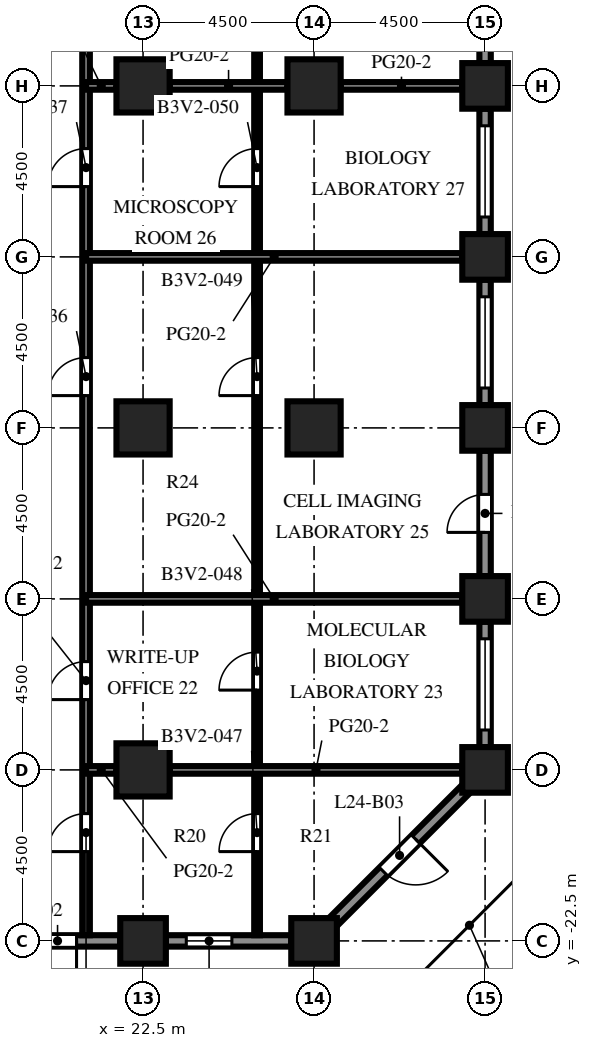
"""IFC4 building model, lengths in metres.
Left out: names, types, materials, properties, quantities, classifications, styles, units other than length and angle.
Written with IfcOpenShell. Run it as: python <this file> out.ifc"""

import sys

from ifc_helpers import new_model, si_unit, direction, frame, frame_2d, origin, origin_2d, place, context, subcontext, project, spatial, rectangle, extrude, element, fill, save


model = new_model("IFC4")
c1 = context("Model", 3, precision=1e-05, world=origin(), true_north=direction((0.0, 1.0)))
c2 = subcontext(c1, "Body", "Model", "MODEL_VIEW")
j1 = project(units=[si_unit("LENGTHUNIT", "METRE"), si_unit("PLANEANGLEUNIT", "RADIAN")], contexts=[c1])
p1 = place(None, origin())
s1 = spatial("IfcSite", under=j1, at=p1, CompositionType="ELEMENT")
p2 = place(p1, origin())
s2 = spatial("IfcBuilding", under=s1, at=p2, CompositionType="ELEMENT")
p3 = place(p2, frame((0.0, 0.0, 106.6)))
s3 = spatial("IfcBuildingStorey", under=s2, at=p3, CompositionType="ELEMENT", Elevation=106.6)
for number, where, z_axis, x_axis in (
    (1, (22.5, -22.5, 0.0), (0.0, 0.0, 1.0), (1.0, 0.0, 0.0)),
    (2, (27.0, -22.5, 0.0), (0.0, 0.0, 1.0), (1.0, 0.0, 0.0)),
    (3, (31.5, -18.0, 0.0), (0.0, 0.0, 1.0), (1.0, 0.0, 0.0)),
    (4, (31.5, -13.5, 0.0), (0.0, 0.0, 1.0), (1.0, 0.0, 0.0)),
    (5, (31.5, -9.0, 0.0), (0.0, 0.0, 1.0), (1.0, 0.0, 0.0)),
    (6, (31.5, -4.5, 0.0), (0.0, 0.0, 1.0), (1.0, 0.0, 0.0)),
    (7, (31.5, 0.0, 0.0), (0.0, 0.0, 1.0), (1.0, 0.0, 0.0)),
):
    element("IfcColumn", number, at=place(p3, frame(where, z_axis=z_axis, x_axis=x_axis)), inside=s3, PredefinedType="COLUMN", context=c2, shape_type="SweptSolid", body=[
        extrude(rectangle(XDim=1.2, YDim=1.2, at=origin_2d()), origin(), (0.0, 0.0, 1.0), 4.1),
    ])
for number, where, z_axis, x_axis in (
    (8, (22.5, -18.0, 0.0), (0.0, 0.0, 1.0), (1.0, 0.0, 0.0)),
    (9, (22.5, -9.0, 0.0), (0.0, 0.0, 1.0), (1.0, 0.0, 0.0)),
    (10, (22.5, 0.0, 0.0), (0.0, 0.0, 1.0), (1.0, 0.0, 0.0)),
    (11, (27.0, -9.0, 0.0), (0.0, 0.0, 1.0), (1.0, 0.0, 0.0)),
    (12, (27.0, 0.0, 0.0), (0.0, 0.0, 1.0), (1.0, 0.0, 0.0)),
):
    element("IfcColumn", number, at=place(p3, frame(where, z_axis=z_axis, x_axis=x_axis)), inside=s3, PredefinedType="COLUMN", context=c2, shape_type="SweptSolid", body=[
        extrude(rectangle(XDim=1.4, YDim=1.4, at=origin_2d()), origin(), (0.0, 0.0, 1.0), 4.1),
    ])
p4 = place(p3, frame((21.9, -22.5, 0.0), z_axis=(0.0, 0.0, 1.0), x_axis=(-1.0, 0.0, 0.0)))
e13 = element("IfcWall", 13, at=p4, inside=s3, PredefinedType="SOLIDWALL", context=c2, shape_type="SweptSolid", body=[
    extrude(rectangle(XDim=3.3, YDim=0.3, at=frame_2d((1.65, 0.0))), origin(), (0.0, 0.0, 1.0), 2.6),
])
p5 = place(p4, frame((1.15, 0.0, 0.0)))
e14 = element("IfcOpeningElement", 14, at=p5, cuts=e13, PredefinedType="OPENING", context=c2, shape_type="SweptSolid", body=[
    extrude(rectangle(XDim=1.0, YDim=2.2, at=frame_2d((0.5, 1.1))), frame((0.0, 0.16, 0.0), z_axis=(0.0, -1.0, 0.0), x_axis=(1.0, 0.0, 0.0)), (0.0, 0.0, 1.0), 0.32),
])
p6 = place(p3, frame((26.4, -22.5, 0.0), z_axis=(0.0, 0.0, 1.0), x_axis=(-1.0, 0.0, 0.0)))
e15 = element("IfcWall", 15, at=p6, inside=s3, PredefinedType="SOLIDWALL", context=c2, shape_type="SweptSolid", body=[
    extrude(rectangle(XDim=3.3, YDim=0.3, at=frame_2d((1.65, 0.0))), origin(), (0.0, 0.0, 1.0), 2.6),
])
p7 = place(p6, frame((1.562, 0.0, 0.8)))
e16 = element("IfcOpeningElement", 16, at=p7, cuts=e15, PredefinedType="OPENING", context=c2, shape_type="SweptSolid", body=[
    extrude(rectangle(XDim=1.2, YDim=1.7, at=frame_2d((0.6, 0.85))), frame((0.0, 0.16, 0.0), z_axis=(0.0, -1.0, 0.0), x_axis=(1.0, 0.0, 0.0)), (0.0, 0.0, 1.0), 0.32),
])
p8 = place(p3, frame((31.006, -18.494, 0.0), z_axis=(0.0, 0.0, 1.0), x_axis=(-0.707106781187, -0.707106781187, 0.0)))
e17 = element("IfcWall", 17, at=p8, inside=s3, PredefinedType="SOLIDWALL", context=c2, shape_type="SweptSolid", body=[
    extrude(rectangle(XDim=4.967, YDim=0.3, at=frame_2d((2.483, 0.0))), origin(), (0.0, 0.0, 1.0), 2.6),
])
p9 = place(p8, frame((1.884, 0.0, 0.0)))
e18 = element("IfcOpeningElement", 18, at=p9, cuts=e17, PredefinedType="OPENING", context=c2, shape_type="SweptSolid", body=[
    extrude(rectangle(XDim=1.2, YDim=2.2, at=frame_2d((0.6, 1.1))), frame((0.0, 0.16, 0.0), z_axis=(0.0, -1.0, 0.0), x_axis=(1.0, 0.0, 0.0)), (0.0, 0.0, 1.0), 0.32),
])
p10 = place(p3, frame((31.5, -14.1, 0.0), z_axis=(0.0, 0.0, 1.0), x_axis=(0.0, -1.0, 0.0)))
e19 = element("IfcWall", 19, at=p10, inside=s3, PredefinedType="SOLIDWALL", context=c2, shape_type="SweptSolid", body=[
    extrude(rectangle(XDim=3.3, YDim=0.3, at=frame_2d((1.65, 0.0))), origin(), (0.0, 0.0, 1.0), 2.6),
])
p11 = place(p10, frame((0.45, 0.0, 0.8)))
e20 = element("IfcOpeningElement", 20, at=p11, cuts=e19, PredefinedType="OPENING", context=c2, shape_type="SweptSolid", body=[
    extrude(rectangle(XDim=2.4, YDim=1.7, at=frame_2d((1.2, 0.85))), frame((0.0, 0.16, 0.0), z_axis=(0.0, -1.0, 0.0), x_axis=(1.0, 0.0, 0.0)), (0.0, 0.0, 1.0), 0.32),
])
p12 = place(p3, frame((31.5, -9.6, 0.0), z_axis=(0.0, 0.0, 1.0), x_axis=(0.0, -1.0, 0.0)))
e21 = element("IfcWall", 21, at=p12, inside=s3, PredefinedType="SOLIDWALL", context=c2, shape_type="SweptSolid", body=[
    extrude(rectangle(XDim=3.3, YDim=0.3, at=frame_2d((1.65, 0.0))), origin(), (0.0, 0.0, 1.0), 2.6),
])
p13 = place(p12, frame((1.15, 0.0, 0.0)))
e22 = element("IfcOpeningElement", 22, at=p13, cuts=e21, PredefinedType="OPENING", context=c2, shape_type="SweptSolid", body=[
    extrude(rectangle(XDim=1.0, YDim=2.2, at=frame_2d((0.5, 1.1))), frame((0.0, 0.16, 0.0), z_axis=(0.0, -1.0, 0.0), x_axis=(1.0, 0.0, 0.0)), (0.0, 0.0, 1.0), 0.32),
])
p14 = place(p3, frame((31.5, -5.1, 0.0), z_axis=(0.0, 0.0, 1.0), x_axis=(0.0, -1.0, 0.0)))
e23 = element("IfcWall", 23, at=p14, inside=s3, PredefinedType="SOLIDWALL", context=c2, shape_type="SweptSolid", body=[
    extrude(rectangle(XDim=3.3, YDim=0.3, at=frame_2d((1.65, 0.0))), origin(), (0.0, 0.0, 1.0), 2.6),
])
p15 = place(p14, frame((0.45, 0.0, 0.8)))
e24 = element("IfcOpeningElement", 24, at=p15, cuts=e23, PredefinedType="OPENING", context=c2, shape_type="SweptSolid", body=[
    extrude(rectangle(XDim=2.4, YDim=1.7, at=frame_2d((1.2, 0.85))), frame((0.0, 0.16, 0.0), z_axis=(0.0, -1.0, 0.0), x_axis=(1.0, 0.0, 0.0)), (0.0, 0.0, 1.0), 0.32),
])
p16 = place(p3, frame((31.5, -0.6, 0.0), z_axis=(0.0, 0.0, 1.0), x_axis=(0.0, -1.0, 0.0)))
e25 = element("IfcWall", 25, at=p16, inside=s3, PredefinedType="SOLIDWALL", context=c2, shape_type="SweptSolid", body=[
    extrude(rectangle(XDim=3.3, YDim=0.3, at=frame_2d((1.65, 0.0))), origin(), (0.0, 0.0, 1.0), 2.6),
])
p17 = place(p16, frame((0.45, 0.0, 0.8)))
e26 = element("IfcOpeningElement", 26, at=p17, cuts=e25, PredefinedType="OPENING", context=c2, shape_type="SweptSolid", body=[
    extrude(rectangle(XDim=2.4, YDim=1.7, at=frame_2d((1.2, 0.85))), frame((0.0, 0.16, 0.0), z_axis=(0.0, -1.0, 0.0), x_axis=(1.0, 0.0, 0.0)), (0.0, 0.0, 1.0), 0.32),
])
p18 = place(p3, frame((31.5, 3.9, 0.0), z_axis=(0.0, 0.0, 1.0), x_axis=(0.0, -1.0, 0.0)))
e27 = element("IfcWall", 27, at=p18, inside=s3, PredefinedType="SOLIDWALL", context=c2, shape_type="SweptSolid", body=[
    extrude(rectangle(XDim=3.3, YDim=0.3, at=frame_2d((1.65, 0.0))), origin(), (0.0, 0.0, 1.0), 2.6),
])
p19 = place(p18, frame((0.45, 0.0, 0.8)))
e28 = element("IfcOpeningElement", 28, at=p19, cuts=e27, PredefinedType="OPENING", context=c2, shape_type="SweptSolid", body=[
    extrude(rectangle(XDim=2.4, YDim=1.7, at=frame_2d((1.2, 0.85))), frame((0.0, 0.16, 0.0), z_axis=(0.0, -1.0, 0.0), x_axis=(1.0, 0.0, 0.0)), (0.0, 0.0, 1.0), 0.32),
])
p20 = place(p3, frame((21.0, 31.35, 0.0), z_axis=(0.0, 0.0, 1.0), x_axis=(0.0, -1.0, 0.0)))
e29 = element("IfcWall", 29, at=p20, inside=s3, PredefinedType="PARTITIONING", context=c2, shape_type="SweptSolid", body=[
    extrude(rectangle(XDim=53.7, YDim=0.2, at=frame_2d((26.85, 0.0))), origin(), (0.0, 0.0, 1.0), 3.5),
])
p21 = place(p20, frame((50.5, 0.0, 0.0)))
e30 = element("IfcOpeningElement", 30, at=p21, cuts=e29, PredefinedType="OPENING", context=c2, shape_type="SweptSolid", body=[
    extrude(rectangle(XDim=1.0, YDim=2.1, at=frame_2d((0.5, 1.05))), frame((0.0, 0.11, 0.0), z_axis=(0.0, -1.0, 0.0), x_axis=(1.0, 0.0, 0.0)), (0.0, 0.0, 1.0), 0.22),
])
p22 = place(p20, frame((46.5, 0.0, 0.0)))
e31 = element("IfcOpeningElement", 31, at=p22, cuts=e29, PredefinedType="OPENING", context=c2, shape_type="SweptSolid", body=[
    extrude(rectangle(XDim=1.0, YDim=2.1, at=frame_2d((0.5, 1.05))), frame((0.0, 0.11, 0.0), z_axis=(0.0, -1.0, 0.0), x_axis=(1.0, 0.0, 0.0)), (0.0, 0.0, 1.0), 0.22),
])
p23 = place(p20, frame((38.5, 0.0, 0.0)))
e32 = element("IfcOpeningElement", 32, at=p23, cuts=e29, PredefinedType="OPENING", context=c2, shape_type="SweptSolid", body=[
    extrude(rectangle(XDim=1.0, YDim=2.1, at=frame_2d((0.5, 1.05))), frame((0.0, 0.11, 0.0), z_axis=(0.0, -1.0, 0.0), x_axis=(1.0, 0.0, 0.0)), (0.0, 0.0, 1.0), 0.22),
])
p24 = place(p20, frame((33.0, 0.0, 0.0)))
e33 = element("IfcOpeningElement", 33, at=p24, cuts=e29, PredefinedType="OPENING", context=c2, shape_type="SweptSolid", body=[
    extrude(rectangle(XDim=1.0, YDim=2.1, at=frame_2d((0.5, 1.05))), frame((0.0, 0.11, 0.0), z_axis=(0.0, -1.0, 0.0), x_axis=(1.0, 0.0, 0.0)), (0.0, 0.0, 1.0), 0.22),
])
p25 = place(p20, frame((23.5, 0.0, 0.0)))
e34 = element("IfcOpeningElement", 34, at=p25, cuts=e29, PredefinedType="OPENING", context=c2, shape_type="SweptSolid", body=[
    extrude(rectangle(XDim=1.0, YDim=2.1, at=frame_2d((0.5, 1.05))), frame((0.0, 0.11, 0.0), z_axis=(0.0, -1.0, 0.0), x_axis=(1.0, 0.0, 0.0)), (0.0, 0.0, 1.0), 0.22),
])
p26 = place(p20, frame((15.75, 0.0, 0.0)))
e35 = element("IfcOpeningElement", 35, at=p26, cuts=e29, PredefinedType="OPENING", context=c2, shape_type="SweptSolid", body=[
    extrude(rectangle(XDim=1.0, YDim=2.1, at=frame_2d((0.5, 1.05))), frame((0.0, 0.11, 0.0), z_axis=(0.0, -1.0, 0.0), x_axis=(1.0, 0.0, 0.0)), (0.0, 0.0, 1.0), 0.22),
])
p27 = place(p20, frame((7.0, 0.0, 0.0)))
e36 = element("IfcOpeningElement", 36, at=p27, cuts=e29, PredefinedType="OPENING", context=c2, shape_type="SweptSolid", body=[
    extrude(rectangle(XDim=1.0, YDim=2.1, at=frame_2d((0.5, 1.05))), frame((0.0, 0.11, 0.0), z_axis=(0.0, -1.0, 0.0), x_axis=(1.0, 0.0, 0.0)), (0.0, 0.0, 1.0), 0.22),
])
p28 = place(p20, frame((1.0, 0.0, 0.0)))
e37 = element("IfcOpeningElement", 37, at=p28, cuts=e29, PredefinedType="OPENING", context=c2, shape_type="SweptSolid", body=[
    extrude(rectangle(XDim=1.0, YDim=2.1, at=frame_2d((0.5, 1.05))), frame((0.0, 0.11, 0.0), z_axis=(0.0, -1.0, 0.0), x_axis=(1.0, 0.0, 0.0)), (0.0, 0.0, 1.0), 0.22),
])
p29 = place(p3, frame((25.5, 31.35, 0.0), z_axis=(0.0, 0.0, 1.0), x_axis=(0.0, -1.0, 0.0)))
e38 = element("IfcWall", 38, at=p29, inside=s3, PredefinedType="PARTITIONING", context=c2, shape_type="SweptSolid", body=[
    extrude(rectangle(XDim=53.7, YDim=0.15, at=frame_2d((26.85, 0.0))), origin(), (0.0, 0.0, 1.0), 3.5),
])
p30 = place(p29, frame((50.5, 0.0, 0.0)))
e39 = element("IfcOpeningElement", 39, at=p30, cuts=e38, PredefinedType="OPENING", context=c2, shape_type="SweptSolid", body=[
    extrude(rectangle(XDim=1.0, YDim=2.1, at=frame_2d((0.5, 1.05))), frame((0.0, 0.085, 0.0), z_axis=(0.0, -1.0, 0.0), x_axis=(1.0, 0.0, 0.0)), (0.0, 0.0, 1.0), 0.17),
])
p31 = place(p29, frame((46.25, 0.0, 0.0)))
e40 = element("IfcOpeningElement", 40, at=p31, cuts=e38, PredefinedType="OPENING", context=c2, shape_type="SweptSolid", body=[
    extrude(rectangle(XDim=1.0, YDim=2.1, at=frame_2d((0.5, 1.05))), frame((0.0, 0.085, 0.0), z_axis=(0.0, -1.0, 0.0), x_axis=(1.0, 0.0, 0.0)), (0.0, 0.0, 1.0), 0.17),
])
p32 = place(p29, frame((38.5, 0.0, 0.0)))
e41 = element("IfcOpeningElement", 41, at=p32, cuts=e38, PredefinedType="OPENING", context=c2, shape_type="SweptSolid", body=[
    extrude(rectangle(XDim=1.0, YDim=2.1, at=frame_2d((0.5, 1.05))), frame((0.0, 0.085, 0.0), z_axis=(0.0, -1.0, 0.0), x_axis=(1.0, 0.0, 0.0)), (0.0, 0.0, 1.0), 0.17),
])
p33 = place(p29, frame((33.0, 0.0, 0.0)))
e42 = element("IfcOpeningElement", 42, at=p33, cuts=e38, PredefinedType="OPENING", context=c2, shape_type="SweptSolid", body=[
    extrude(rectangle(XDim=1.0, YDim=2.1, at=frame_2d((0.5, 1.05))), frame((0.0, 0.085, 0.0), z_axis=(0.0, -1.0, 0.0), x_axis=(1.0, 0.0, 0.0)), (0.0, 0.0, 1.0), 0.17),
])
p34 = place(p29, frame((24.75, 0.0, 0.0)))
e43 = element("IfcOpeningElement", 43, at=p34, cuts=e38, PredefinedType="OPENING", context=c2, shape_type="SweptSolid", body=[
    extrude(rectangle(XDim=1.0, YDim=2.1, at=frame_2d((0.5, 1.05))), frame((0.0, 0.085, 0.0), z_axis=(0.0, -1.0, 0.0), x_axis=(1.0, 0.0, 0.0)), (0.0, 0.0, 1.0), 0.17),
])
p35 = place(p29, frame((15.5, 0.0, 0.0)))
e44 = element("IfcOpeningElement", 44, at=p35, cuts=e38, PredefinedType="OPENING", context=c2, shape_type="SweptSolid", body=[
    extrude(rectangle(XDim=1.0, YDim=2.1, at=frame_2d((0.5, 1.05))), frame((0.0, 0.085, 0.0), z_axis=(0.0, -1.0, 0.0), x_axis=(1.0, 0.0, 0.0)), (0.0, 0.0, 1.0), 0.17),
])
p36 = place(p29, frame((9.75, 0.0, 0.0)))
e45 = element("IfcOpeningElement", 45, at=p36, cuts=e38, PredefinedType="OPENING", context=c2, shape_type="SweptSolid", body=[
    extrude(rectangle(XDim=1.0, YDim=2.1, at=frame_2d((0.5, 1.05))), frame((0.0, 0.085, 0.0), z_axis=(0.0, -1.0, 0.0), x_axis=(1.0, 0.0, 0.0)), (0.0, 0.0, 1.0), 0.17),
])
p37 = place(p29, frame((1.5, 0.0, 0.0)))
e46 = element("IfcOpeningElement", 46, at=p37, cuts=e38, PredefinedType="OPENING", context=c2, shape_type="SweptSolid", body=[
    extrude(rectangle(XDim=1.0, YDim=2.1, at=frame_2d((0.5, 1.05))), frame((0.0, 0.085, 0.0), z_axis=(0.0, -1.0, 0.0), x_axis=(1.0, 0.0, 0.0)), (0.0, 0.0, 1.0), 0.17),
])
p38 = place(p3, frame((21.0, -18.0, 0.0), z_axis=(0.0, 0.0, 1.0), x_axis=(1.0, 0.0, 0.0)))
e47 = element("IfcWall", 47, at=p38, inside=s3, PredefinedType="PARTITIONING", context=c2, shape_type="SweptSolid", body=[
    extrude(rectangle(XDim=0.8, YDim=0.2, at=frame_2d((0.4, 0.0))), origin(), (0.0, 0.0, 1.0), 3.5),
])
p39 = place(p3, frame((23.2, -18.0, 0.0), z_axis=(0.0, 0.0, 1.0), x_axis=(1.0, 0.0, 0.0)))
e48 = element("IfcWall", 48, at=p39, inside=s3, PredefinedType="PARTITIONING", context=c2, shape_type="SweptSolid", body=[
    extrude(rectangle(XDim=7.7, YDim=0.2, at=frame_2d((3.85, 0.0))), origin(), (0.0, 0.0, 1.0), 3.5),
])
for number, where, z_axis, x_axis in (
    (49, (21.0, -13.5, 0.0), (0.0, 0.0, 1.0), (1.0, 0.0, 0.0)),
    (50, (21.0, -4.5, 0.0), (0.0, 0.0, 1.0), (1.0, 0.0, 0.0)),
):
    element("IfcWall", number, at=place(p3, frame(where, z_axis=z_axis, x_axis=x_axis)), inside=s3, PredefinedType="PARTITIONING", context=c2, shape_type="SweptSolid", body=[
        extrude(rectangle(XDim=9.9, YDim=0.2, at=frame_2d((4.95, 0.0))), origin(), (0.0, 0.0, 1.0), 3.5),
    ])
p40 = place(p3, frame((21.0, 0.0, 0.0), z_axis=(0.0, 0.0, 1.0), x_axis=(1.0, 0.0, 0.0)))
e51 = element("IfcWall", 51, at=p40, inside=s3, PredefinedType="PARTITIONING", context=c2, shape_type="SweptSolid", body=[
    extrude(rectangle(XDim=0.8, YDim=0.2, at=frame_2d((0.4, 0.0))), origin(), (0.0, 0.0, 1.0), 3.5),
])
p41 = place(p3, frame((23.2, 0.0, 0.0), z_axis=(0.0, 0.0, 1.0), x_axis=(1.0, 0.0, 0.0)))
e52 = element("IfcWall", 52, at=p41, inside=s3, PredefinedType="PARTITIONING", context=c2, shape_type="SweptSolid", body=[
    extrude(rectangle(XDim=3.1, YDim=0.2, at=frame_2d((1.55, 0.0))), origin(), (0.0, 0.0, 1.0), 3.5),
])
p42 = place(p3, frame((27.7, 0.0, 0.0), z_axis=(0.0, 0.0, 1.0), x_axis=(1.0, 0.0, 0.0)))
e53 = element("IfcWall", 53, at=p42, inside=s3, PredefinedType="PARTITIONING", context=c2, shape_type="SweptSolid", body=[
    extrude(rectangle(XDim=3.2, YDim=0.2, at=frame_2d((1.6, 0.0))), origin(), (0.0, 0.0, 1.0), 3.5),
])
p43 = place(p5, origin())
e54 = element("IfcDoor", 54, at=p43, inside=s3, OperationType="SINGLE_SWING_LEFT", PredefinedType="DOOR", context=c2, shape_type="SweptSolid", body=[
    extrude(rectangle(XDim=1.0, YDim=2.2, at=frame_2d((0.5, 1.1))), frame((0.0, 0.025, 0.0), z_axis=(0.0, -1.0, 0.0), x_axis=(1.0, 0.0, 0.0)), (0.0, 0.0, 1.0), 0.05),
])
fill(e14, e54)
p44 = place(p7, origin())
e55 = element("IfcWindow", 55, at=p44, inside=s3, PartitioningType="SINGLE_PANEL", PredefinedType="WINDOW", context=c2, shape_type="SweptSolid", body=[
    extrude(rectangle(XDim=1.2, YDim=1.7, at=frame_2d((0.6, 0.85))), frame((0.0, 0.03, 0.0), z_axis=(0.0, -1.0, 0.0), x_axis=(1.0, 0.0, 0.0)), (0.0, 0.0, 1.0), 0.06),
])
fill(e16, e55)
p45 = place(p9, origin())
e56 = element("IfcDoor", 56, at=p45, inside=s3, OperationType="SINGLE_SWING_LEFT", PredefinedType="DOOR", context=c2, shape_type="SweptSolid", body=[
    extrude(rectangle(XDim=1.2, YDim=2.2, at=frame_2d((0.6, 1.1))), frame((0.0, 0.025, 0.0), z_axis=(0.0, -1.0, 0.0), x_axis=(1.0, 0.0, 0.0)), (0.0, 0.0, 1.0), 0.05),
])
fill(e18, e56)
p46 = place(p11, origin())
e57 = element("IfcWindow", 57, at=p46, inside=s3, PartitioningType="SINGLE_PANEL", PredefinedType="WINDOW", context=c2, shape_type="SweptSolid", body=[
    extrude(rectangle(XDim=2.4, YDim=1.7, at=frame_2d((1.2, 0.85))), frame((0.0, 0.03, 0.0), z_axis=(0.0, -1.0, 0.0), x_axis=(1.0, 0.0, 0.0)), (0.0, 0.0, 1.0), 0.06),
])
fill(e20, e57)
p47 = place(p13, origin())
e58 = element("IfcDoor", 58, at=p47, inside=s3, OperationType="SINGLE_SWING_RIGHT", PredefinedType="DOOR", context=c2, shape_type="SweptSolid", body=[
    extrude(rectangle(XDim=1.0, YDim=2.2, at=frame_2d((0.5, 1.1))), frame((0.0, 0.025, 0.0), z_axis=(0.0, -1.0, 0.0), x_axis=(1.0, 0.0, 0.0)), (0.0, 0.0, 1.0), 0.05),
])
fill(e22, e58)
p48 = place(p15, origin())
e59 = element("IfcWindow", 59, at=p48, inside=s3, PartitioningType="SINGLE_PANEL", PredefinedType="WINDOW", context=c2, shape_type="SweptSolid", body=[
    extrude(rectangle(XDim=2.4, YDim=1.7, at=frame_2d((1.2, 0.85))), frame((0.0, 0.03, 0.0), z_axis=(0.0, -1.0, 0.0), x_axis=(1.0, 0.0, 0.0)), (0.0, 0.0, 1.0), 0.06),
])
fill(e24, e59)
p49 = place(p17, origin())
e60 = element("IfcWindow", 60, at=p49, inside=s3, PartitioningType="SINGLE_PANEL", PredefinedType="WINDOW", context=c2, shape_type="SweptSolid", body=[
    extrude(rectangle(XDim=2.4, YDim=1.7, at=frame_2d((1.2, 0.85))), frame((0.0, 0.03, 0.0), z_axis=(0.0, -1.0, 0.0), x_axis=(1.0, 0.0, 0.0)), (0.0, 0.0, 1.0), 0.06),
])
fill(e26, e60)
p50 = place(p21, origin())
e61 = element("IfcDoor", 61, at=p50, inside=s3, OperationType="SINGLE_SWING_RIGHT", PredefinedType="DOOR", context=c2, shape_type="SweptSolid", body=[
    extrude(rectangle(XDim=1.0, YDim=2.1, at=frame_2d((0.5, 1.05))), frame((0.0, 0.025, 0.0), z_axis=(0.0, -1.0, 0.0), x_axis=(1.0, 0.0, 0.0)), (0.0, 0.0, 1.0), 0.05),
])
fill(e30, e61)
p51 = place(p22, origin())
e62 = element("IfcDoor", 62, at=p51, inside=s3, OperationType="SINGLE_SWING_RIGHT", PredefinedType="DOOR", context=c2, shape_type="SweptSolid", body=[
    extrude(rectangle(XDim=1.0, YDim=2.1, at=frame_2d((0.5, 1.05))), frame((0.0, 0.025, 0.0), z_axis=(0.0, -1.0, 0.0), x_axis=(1.0, 0.0, 0.0)), (0.0, 0.0, 1.0), 0.05),
])
fill(e31, e62)
p52 = place(p23, origin())
e63 = element("IfcDoor", 63, at=p52, inside=s3, OperationType="SINGLE_SWING_RIGHT", PredefinedType="DOOR", context=c2, shape_type="SweptSolid", body=[
    extrude(rectangle(XDim=1.0, YDim=2.1, at=frame_2d((0.5, 1.05))), frame((0.0, 0.025, 0.0), z_axis=(0.0, -1.0, 0.0), x_axis=(1.0, 0.0, 0.0)), (0.0, 0.0, 1.0), 0.05),
])
fill(e32, e63)
p53 = place(p24, origin())
e64 = element("IfcDoor", 64, at=p53, inside=s3, OperationType="SINGLE_SWING_RIGHT", PredefinedType="DOOR", context=c2, shape_type="SweptSolid", body=[
    extrude(rectangle(XDim=1.0, YDim=2.1, at=frame_2d((0.5, 1.05))), frame((0.0, 0.025, 0.0), z_axis=(0.0, -1.0, 0.0), x_axis=(1.0, 0.0, 0.0)), (0.0, 0.0, 1.0), 0.05),
])
fill(e33, e64)
p54 = place(p30, origin())
e65 = element("IfcDoor", 65, at=p54, inside=s3, OperationType="SINGLE_SWING_RIGHT", PredefinedType="DOOR", context=c2, shape_type="SweptSolid", body=[
    extrude(rectangle(XDim=1.0, YDim=2.1, at=frame_2d((0.5, 1.05))), frame((0.0, 0.025, 0.0), z_axis=(0.0, -1.0, 0.0), x_axis=(1.0, 0.0, 0.0)), (0.0, 0.0, 1.0), 0.05),
])
fill(e39, e65)
p55 = place(p31, origin())
e66 = element("IfcDoor", 66, at=p55, inside=s3, OperationType="SINGLE_SWING_RIGHT", PredefinedType="DOOR", context=c2, shape_type="SweptSolid", body=[
    extrude(rectangle(XDim=1.0, YDim=2.1, at=frame_2d((0.5, 1.05))), frame((0.0, 0.025, 0.0), z_axis=(0.0, -1.0, 0.0), x_axis=(1.0, 0.0, 0.0)), (0.0, 0.0, 1.0), 0.05),
])
fill(e40, e66)
p56 = place(p32, origin())
e67 = element("IfcDoor", 67, at=p56, inside=s3, OperationType="SINGLE_SWING_RIGHT", PredefinedType="DOOR", context=c2, shape_type="SweptSolid", body=[
    extrude(rectangle(XDim=1.0, YDim=2.1, at=frame_2d((0.5, 1.05))), frame((0.0, 0.025, 0.0), z_axis=(0.0, -1.0, 0.0), x_axis=(1.0, 0.0, 0.0)), (0.0, 0.0, 1.0), 0.05),
])
fill(e41, e67)
p57 = place(p33, origin())
e68 = element("IfcDoor", 68, at=p57, inside=s3, OperationType="SINGLE_SWING_RIGHT", PredefinedType="DOOR", context=c2, shape_type="SweptSolid", body=[
    extrude(rectangle(XDim=1.0, YDim=2.1, at=frame_2d((0.5, 1.05))), frame((0.0, 0.025, 0.0), z_axis=(0.0, -1.0, 0.0), x_axis=(1.0, 0.0, 0.0)), (0.0, 0.0, 1.0), 0.05),
])
fill(e42, e68)
save(model, sys.argv[1])
